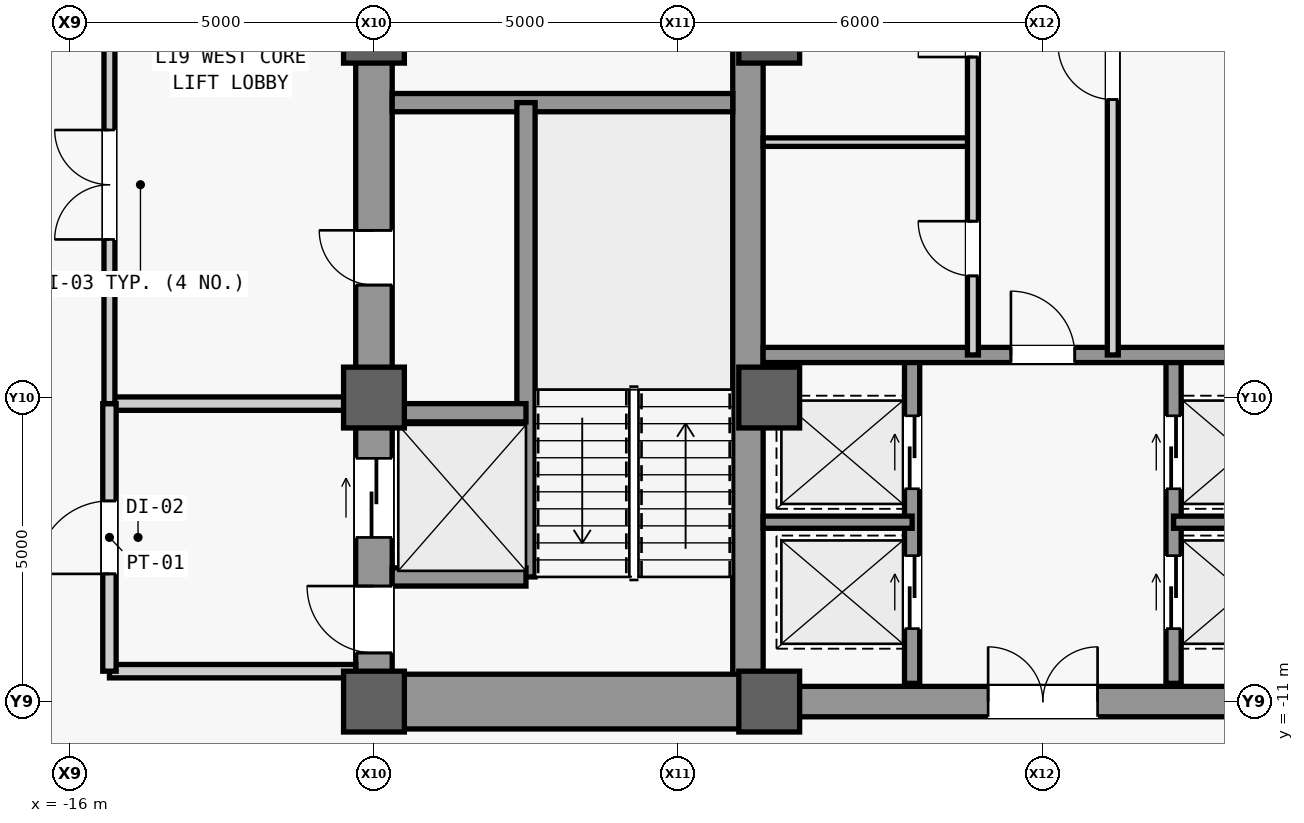
"""IFC4 building model, lengths in metres.
Left out: names, types, materials, properties, quantities, classifications, styles, units other than length and angle.
Written with IfcOpenShell. Run it as: python <this file> out.ifc"""

import sys

from ifc_helpers import new_model, si_unit, direction, frame, frame_2d, origin, origin_2d, place, context, subcontext, project, spatial, rectangle, extrude, source, transform, mapped, element, fill, save


model = new_model("IFC4")
c1 = context("Model", 3, precision=1e-05, world=origin(), true_north=direction((0.0, 1.0)))
c2 = subcontext(c1, "Body", "Model", "MODEL_VIEW")
j1 = project(units=[si_unit("LENGTHUNIT", "METRE"), si_unit("PLANEANGLEUNIT", "RADIAN")], contexts=[c1])
p1 = place(None, origin())
s1 = spatial("IfcSite", under=j1, at=p1, CompositionType="ELEMENT")
p2 = place(p1, origin())
s2 = spatial("IfcBuilding", under=s1, at=p2, CompositionType="ELEMENT")
p3 = place(p2, frame((0.0, 0.0, 87.2)))
s3 = spatial("IfcBuildingStorey", under=s2, at=p3, CompositionType="ELEMENT", Elevation=87.2)
m1 = source(origin(), c2, "Body", "SweptSolid", [
    extrude(rectangle(XDim=22.0, YDim=0.6, at=frame_2d((11.0, 0.0))), origin(), (0.0, 0.0, 1.0), 3.94),
])
p4 = place(p3, frame((-11.0, -11.0, 0.0), z_axis=(0.0, 0.0, 1.0), x_axis=(0.0, 1.0, 0.0)))
e1 = element("IfcWall", 1, at=p4, inside=s3, PredefinedType="SHEAR", context=c2, shape_type="MappedRepresentation", body=[
    mapped(m1, transform((0.0, 0.0, 0.0), scale=1.0)),
])
m2 = source(origin(), c2, "Body", "SweptSolid", [
    extrude(rectangle(XDim=1.1, YDim=2.2, at=frame_2d((0.55, 1.1))), frame((0.0, 0.31, 0.0), z_axis=(0.0, -1.0, 0.0), x_axis=(1.0, 0.0, 0.0)), (0.0, 0.0, 1.0), 0.62),
])
p5 = place(p4, frame((0.8, 0.0, 0.0)))
e2 = element("IfcOpeningElement", 2, at=p5, cuts=e1, PredefinedType="OPENING", context=c2, shape_type="MappedRepresentation", body=[
    mapped(m2, transform((0.0, 0.0, 0.0), scale=1.0)),
])
p6 = place(p4, frame((12.5, 0.0, 0.0)))
e3 = element("IfcOpeningElement", 3, at=p6, cuts=e1, PredefinedType="OPENING", context=c2, shape_type="MappedRepresentation", body=[
    mapped(m2, transform((0.0, 0.0, 0.0), scale=1.0)),
])
m3 = source(origin(), c2, "Body", "SweptSolid", [
    extrude(rectangle(XDim=0.9, YDim=2.15, at=frame_2d((0.45, 1.075))), frame((0.0, 0.31, 0.0), z_axis=(0.0, -1.0, 0.0), x_axis=(1.0, 0.0, 0.0)), (0.0, 0.0, 1.0), 0.62),
])
p7 = place(p4, frame((6.85, 0.0, 0.0)))
e4 = element("IfcOpeningElement", 4, at=p7, cuts=e1, PredefinedType="OPENING", context=c2, shape_type="MappedRepresentation", body=[
    mapped(m3, transform((0.0, 0.0, 0.0), scale=1.0)),
])
m4 = source(origin(), c2, "Body", "SweptSolid", [
    extrude(rectangle(XDim=1.3, YDim=2.3, at=frame_2d((0.65, 1.15))), frame((0.0, 0.31, 0.0), z_axis=(0.0, -1.0, 0.0), x_axis=(1.0, 0.0, 0.0)), (0.0, 0.0, 1.0), 0.62),
])
p8 = place(p4, frame((2.7, 0.0, 0.0)))
e5 = element("IfcOpeningElement", 5, at=p8, cuts=e1, PredefinedType="OPENING", context=c2, shape_type="MappedRepresentation", body=[
    mapped(m4, transform((0.0, 0.0, 0.0), scale=1.0)),
])
m5 = source(origin(), c2, "Body", "SweptSolid", [
    extrude(rectangle(XDim=21.4, YDim=0.5, at=frame_2d((10.7, 0.0))), origin(), (0.0, 0.0, 1.0), 3.94),
])
p9 = place(p3, frame((-4.85, -10.7, 0.0), z_axis=(0.0, 0.0, 1.0), x_axis=(0.0, 1.0, 0.0)))
e6 = element("IfcWall", 6, at=p9, inside=s3, PredefinedType="SHEAR", context=c2, shape_type="MappedRepresentation", body=[
    mapped(m5, transform((0.0, 0.0, 0.0), scale=1.0)),
])
m6 = source(origin(), c2, "Body", "SweptSolid", [
    extrude(rectangle(XDim=5.85, YDim=0.9, at=frame_2d((2.925, 0.0))), origin(), (0.0, 0.0, 1.0), 3.94),
])
p10 = place(p3, frame((-10.7, -11.0, 0.0), z_axis=(0.0, 0.0, 1.0), x_axis=(1.0, 0.0, 0.0)))
e7 = element("IfcWall", 7, at=p10, inside=s3, PredefinedType="SHEAR", context=c2, shape_type="MappedRepresentation", body=[
    mapped(m6, transform((0.0, 0.0, 0.0), scale=1.0)),
])
m7 = source(origin(), c2, "Body", "SweptSolid", [
    extrude(rectangle(XDim=5.6, YDim=0.3, at=frame_2d((2.8, 0.0))), origin(), (0.0, 0.0, 1.0), 3.94),
])
p11 = place(p3, frame((-10.7, -1.15, 0.0), z_axis=(0.0, 0.0, 1.0), x_axis=(1.0, 0.0, 0.0)))
e8 = element("IfcWall", 8, at=p11, inside=s3, PredefinedType="SHEAR", context=c2, shape_type="MappedRepresentation", body=[
    mapped(m7, transform((0.0, 0.0, 0.0), scale=1.0)),
])
m8 = source(origin(), c2, "Body", "SweptSolid", [
    extrude(rectangle(XDim=9.2, YDim=0.5, at=frame_2d((4.6, 0.0))), origin(), (0.0, 0.0, 1.0), 3.94),
])
p12 = place(p3, frame((-4.6, -11.0, 0.0), z_axis=(0.0, 0.0, 1.0), x_axis=(1.0, 0.0, 0.0)))
e9 = element("IfcWall", 9, at=p12, inside=s3, PredefinedType="SHEAR", context=c2, shape_type="MappedRepresentation", body=[
    mapped(m8, transform((0.0, 0.0, 0.0), scale=1.0)),
])
m9 = source(origin(), c2, "Body", "SweptSolid", [
    extrude(rectangle(XDim=1.8, YDim=2.25, at=frame_2d((0.9, 1.125))), frame((0.0, 0.26, 0.0), z_axis=(0.0, -1.0, 0.0), x_axis=(1.0, 0.0, 0.0)), (0.0, 0.0, 1.0), 0.52),
])
p13 = place(p12, frame((3.7, 0.0, 0.0)))
e10 = element("IfcOpeningElement", 10, at=p13, cuts=e9, PredefinedType="OPENING", context=c2, shape_type="MappedRepresentation", body=[
    mapped(m9, transform((0.0, 0.0, 0.0), scale=1.0)),
])
m10 = source(origin(), c2, "Body", "SweptSolid", [
    extrude(rectangle(XDim=1.0, YDim=1.0, at=origin_2d()), origin(), (0.0, 0.0, 1.0), 4.2),
])
for number, where, z_axis, x_axis in (
    (11, (-11.0, -11.0, 0.0), (0.0, 0.0, 1.0), (1.0, 0.0, 0.0)),
    (12, (-11.0, -6.0, 0.0), (0.0, 0.0, 1.0), (1.0, 0.0, 0.0)),
    (13, (-11.0, 0.0, 0.0), (0.0, 0.0, 1.0), (1.0, 0.0, 0.0)),
    (14, (-4.5, -11.0, 0.0), (0.0, 0.0, 1.0), (1.0, 0.0, 0.0)),
    (15, (-4.5, -6.0, 0.0), (0.0, 0.0, 1.0), (1.0, 0.0, 0.0)),
    (16, (-4.5, 0.0, 0.0), (0.0, 0.0, 1.0), (1.0, 0.0, 0.0)),
):
    element("IfcColumn", number, at=place(p3, frame(where, z_axis=z_axis, x_axis=x_axis)), inside=s3, PredefinedType="COLUMN", context=c2, shape_type="MappedRepresentation", body=[
        mapped(m10, transform((0.0, 0.0, 0.0), scale=1.0)),
    ])
m11 = source(origin(), c2, "Body", "SweptSolid", [
    extrude(rectangle(XDim=7.8, YDim=0.3, at=frame_2d((3.9, 0.0))), origin(), (0.0, 0.0, 1.0), 3.94),
])
p14 = place(p3, frame((-8.5, -8.95, 0.0), z_axis=(0.0, 0.0, 1.0), x_axis=(0.0, 1.0, 0.0)))
e17 = element("IfcWall", 17, at=p14, inside=s3, PredefinedType="SHEAR", context=c2, shape_type="MappedRepresentation", body=[
    mapped(m11, transform((0.0, 0.0, 0.0), scale=1.0)),
])
m12 = source(origin(), c2, "Body", "SweptSolid", [
    extrude(rectangle(XDim=2.2, YDim=0.3, at=frame_2d((1.1, 0.0))), origin(), (0.0, 0.0, 1.0), 3.94),
])
for number, where, z_axis, x_axis in (
    (18, (-10.7, -8.95, 0.0), (0.0, 0.0, 1.0), (1.0, 0.0, 0.0)),
    (19, (-10.7, -6.25, 0.0), (0.0, 0.0, 1.0), (1.0, 0.0, 0.0)),
):
    element("IfcWall", number, at=place(p3, frame(where, z_axis=z_axis, x_axis=x_axis)), inside=s3, PredefinedType="SHEAR", context=c2, shape_type="MappedRepresentation", body=[
        mapped(m12, transform((0.0, 0.0, 0.0), scale=1.0)),
    ])
m13 = source(origin(), c2, "Body", "SweptSolid", [
    extrude(rectangle(XDim=4.05, YDim=0.22, at=frame_2d((2.025, 0.0))), origin(), (0.0, 0.0, 1.0), 3.94),
])
p15 = place(p3, frame((-15.35, -10.5, 0.0), z_axis=(0.0, 0.0, 1.0), x_axis=(1.0, 0.0, 0.0)))
e20 = element("IfcWall", 20, at=p15, inside=s3, PredefinedType="PARTITIONING", context=c2, shape_type="MappedRepresentation", body=[
    mapped(m13, transform((0.0, 0.0, 0.0), scale=1.0)),
])
m14 = source(origin(), c2, "Body", "SweptSolid", [
    extrude(rectangle(XDim=4.05, YDim=0.22, at=frame_2d((2.025, 0.0))), origin(), (0.0, 0.0, 1.0), 2.54),
])
p16 = place(p3, frame((-15.35, -6.1, 0.0), z_axis=(0.0, 0.0, 1.0), x_axis=(1.0, 0.0, 0.0)))
e21 = element("IfcWall", 21, at=p16, inside=s3, PredefinedType="PARTITIONING", context=c2, shape_type="MappedRepresentation", body=[
    mapped(m14, transform((0.0, 0.0, 0.0), scale=1.0)),
])
m15 = source(origin(), c2, "Body", "SweptSolid", [
    extrude(rectangle(XDim=4.4, YDim=0.22, at=frame_2d((2.2, 0.0))), origin(), (0.0, 0.0, 1.0), 3.94),
])
p17 = place(p3, frame((-15.35, -10.5, 0.0), z_axis=(0.0, 0.0, 1.0), x_axis=(0.0, 1.0, 0.0)))
e22 = element("IfcWall", 22, at=p17, inside=s3, PredefinedType="PARTITIONING", context=c2, shape_type="MappedRepresentation", body=[
    mapped(m15, transform((0.0, 0.0, 0.0), scale=1.0)),
])
m16 = source(origin(), c2, "Body", "SweptSolid", [
    extrude(rectangle(XDim=1.2, YDim=2.2, at=frame_2d((0.6, 1.1))), frame((0.0, 0.12, 0.0), z_axis=(0.0, -1.0, 0.0), x_axis=(1.0, 0.0, 0.0)), (0.0, 0.0, 1.0), 0.24),
])
p18 = place(p17, frame((1.6, 0.0, 0.0)))
e23 = element("IfcOpeningElement", 23, at=p18, cuts=e22, PredefinedType="OPENING", context=c2, shape_type="MappedRepresentation", body=[
    mapped(m16, transform((0.0, 0.0, 0.0), scale=1.0)),
])
m17 = source(origin(), c2, "Body", "SweptSolid", [
    extrude(rectangle(XDim=16.6, YDim=0.18, at=frame_2d((8.3, 0.0))), origin(), (0.0, 0.0, 1.0), 3.94),
])
p19 = place(p3, frame((-15.35, -6.1, 0.0), z_axis=(0.0, 0.0, 1.0), x_axis=(0.0, 1.0, 0.0)))
e24 = element("IfcWall", 24, at=p19, inside=s3, PredefinedType="PARTITIONING", context=c2, shape_type="MappedRepresentation", body=[
    mapped(m17, transform((0.0, 0.0, 0.0), scale=1.0)),
])
m18 = source(origin(), c2, "Body", "SweptSolid", [
    extrude(rectangle(XDim=1.8, YDim=2.25, at=frame_2d((0.9, 1.125))), frame((0.0, 0.1, 0.0), z_axis=(0.0, -1.0, 0.0), x_axis=(1.0, 0.0, 0.0)), (0.0, 0.0, 1.0), 0.2),
])
p20 = place(p19, frame((2.7, 0.0, 0.0)))
e25 = element("IfcOpeningElement", 25, at=p20, cuts=e24, PredefinedType="OPENING", context=c2, shape_type="MappedRepresentation", body=[
    mapped(m18, transform((0.0, 0.0, 0.0), scale=1.0)),
])
p21 = place(p19, frame((11.0, 0.0, 0.0)))
e26 = element("IfcOpeningElement", 26, at=p21, cuts=e24, PredefinedType="OPENING", context=c2, shape_type="MappedRepresentation", body=[
    mapped(m18, transform((0.0, 0.0, 0.0), scale=1.0)),
])
m19 = source(origin(), c2, "Body", "SweptSolid", [
    extrude(rectangle(XDim=5.4, YDim=0.25, at=frame_2d((2.7, 0.0))), origin(), (0.0, 0.0, 1.0), 3.94),
])
p22 = place(p3, frame((-2.15, -10.7, 0.0), z_axis=(0.0, 0.0, 1.0), x_axis=(0.0, 1.0, 0.0)))
e27 = element("IfcWall", 27, at=p22, inside=s3, PredefinedType="SHEAR", context=c2, shape_type="MappedRepresentation", body=[
    mapped(m19, transform((0.0, 0.0, 0.0), scale=1.0)),
])
m20 = source(origin(), c2, "Body", "SweptSolid", [
    extrude(rectangle(XDim=1.2, YDim=2.3, at=frame_2d((0.6, 1.15))), frame((0.0, 0.135, 0.0), z_axis=(0.0, -1.0, 0.0), x_axis=(1.0, 0.0, 0.0)), (0.0, 0.0, 1.0), 0.27),
])
p23 = place(p22, frame((0.9, 0.0, 0.0)))
e28 = element("IfcOpeningElement", 28, at=p23, cuts=e27, PredefinedType="OPENING", context=c2, shape_type="MappedRepresentation", body=[
    mapped(m20, transform((0.0, 0.0, 0.0), scale=1.0)),
])
p24 = place(p22, frame((3.2, 0.0, 0.0)))
e29 = element("IfcOpeningElement", 29, at=p24, cuts=e27, PredefinedType="OPENING", context=c2, shape_type="MappedRepresentation", body=[
    mapped(m20, transform((0.0, 0.0, 0.0), scale=1.0)),
])
p25 = place(p3, frame((2.15, -10.7, 0.0), z_axis=(0.0, 0.0, 1.0), x_axis=(0.0, 1.0, 0.0)))
e30 = element("IfcWall", 30, at=p25, inside=s3, PredefinedType="SHEAR", context=c2, shape_type="MappedRepresentation", body=[
    mapped(m19, transform((0.0, 0.0, 0.0), scale=1.0)),
])
p26 = place(p25, frame((0.9, 0.0, 0.0)))
e31 = element("IfcOpeningElement", 31, at=p26, cuts=e30, PredefinedType="OPENING", context=c2, shape_type="MappedRepresentation", body=[
    mapped(m20, transform((0.0, 0.0, 0.0), scale=1.0)),
])
p27 = place(p25, frame((3.2, 0.0, 0.0)))
e32 = element("IfcOpeningElement", 32, at=p27, cuts=e30, PredefinedType="OPENING", context=c2, shape_type="MappedRepresentation", body=[
    mapped(m20, transform((0.0, 0.0, 0.0), scale=1.0)),
])
m21 = source(origin(), c2, "Body", "SweptSolid", [
    extrude(rectangle(XDim=2.45, YDim=0.2, at=frame_2d((1.225, 0.0))), origin(), (0.0, 0.0, 1.0), 3.94),
])
for number, where, z_axis, x_axis in (
    (33, (-4.6, -8.05, 0.0), (0.0, 0.0, 1.0), (1.0, 0.0, 0.0)),
    (34, (2.15, -8.05, 0.0), (0.0, 0.0, 1.0), (1.0, 0.0, 0.0)),
):
    element("IfcWall", number, at=place(p3, frame(where, z_axis=z_axis, x_axis=x_axis)), inside=s3, PredefinedType="SHEAR", context=c2, shape_type="MappedRepresentation", body=[
        mapped(m21, transform((0.0, 0.0, 0.0), scale=1.0)),
    ])
m22 = source(origin(), c2, "Body", "SweptSolid", [
    extrude(rectangle(XDim=9.2, YDim=0.25, at=frame_2d((4.6, 0.0))), origin(), (0.0, 0.0, 1.0), 3.94),
])
p28 = place(p3, frame((-4.6, -5.3, 0.0), z_axis=(0.0, 0.0, 1.0), x_axis=(1.0, 0.0, 0.0)))
e35 = element("IfcWall", 35, at=p28, inside=s3, PredefinedType="SHEAR", context=c2, shape_type="MappedRepresentation", body=[
    mapped(m22, transform((0.0, 0.0, 0.0), scale=1.0)),
])
m23 = source(origin(), c2, "Body", "SweptSolid", [
    extrude(rectangle(XDim=1.05, YDim=2.2, at=frame_2d((0.525, 1.1))), frame((0.0, 0.135, 0.0), z_axis=(0.0, -1.0, 0.0), x_axis=(1.0, 0.0, 0.0)), (0.0, 0.0, 1.0), 0.27),
])
p29 = place(p28, frame((4.075, 0.0, 0.0)))
e36 = element("IfcOpeningElement", 36, at=p29, cuts=e35, PredefinedType="OPENING", context=c2, shape_type="MappedRepresentation", body=[
    mapped(m23, transform((0.0, 0.0, 0.0), scale=1.0)),
])
m24 = source(origin(), c2, "Body", "SweptSolid", [
    extrude(rectangle(XDim=3.45, YDim=0.14, at=frame_2d((1.725, 0.0))), origin(), (0.0, 0.0, 1.0), 3.94),
])
p30 = place(p3, frame((-4.6, -1.8, 0.0), z_axis=(0.0, 0.0, 1.0), x_axis=(1.0, 0.0, 0.0)))
e37 = element("IfcWall", 37, at=p30, inside=s3, PredefinedType="PARTITIONING", context=c2, shape_type="MappedRepresentation", body=[
    mapped(m24, transform((0.0, 0.0, 0.0), scale=1.0)),
])
m25 = source(origin(), c2, "Body", "SweptSolid", [
    extrude(rectangle(XDim=10.6, YDim=0.18, at=frame_2d((5.3, 0.0))), origin(), (0.0, 0.0, 1.0), 3.94),
])
p31 = place(p3, frame((-1.15, -5.3, 0.0), z_axis=(0.0, 0.0, 1.0), x_axis=(0.0, 1.0, 0.0)))
e38 = element("IfcWall", 38, at=p31, inside=s3, PredefinedType="PARTITIONING", context=c2, shape_type="MappedRepresentation", body=[
    mapped(m25, transform((0.0, 0.0, 0.0), scale=1.0)),
])
m26 = source(origin(), c2, "Body", "SweptSolid", [
    extrude(rectangle(XDim=0.9, YDim=2.15, at=frame_2d((0.45, 1.075))), frame((0.0, 0.1, 0.0), z_axis=(0.0, -1.0, 0.0), x_axis=(1.0, 0.0, 0.0)), (0.0, 0.0, 1.0), 0.2),
])
p32 = place(p31, frame((1.3, 0.0, 0.0)))
e39 = element("IfcOpeningElement", 39, at=p32, cuts=e38, PredefinedType="OPENING", context=c2, shape_type="MappedRepresentation", body=[
    mapped(m26, transform((0.0, 0.0, 0.0), scale=1.0)),
])
p33 = place(p31, frame((4.9, 0.0, 0.0)))
e40 = element("IfcOpeningElement", 40, at=p33, cuts=e38, PredefinedType="OPENING", context=c2, shape_type="MappedRepresentation", body=[
    mapped(m26, transform((0.0, 0.0, 0.0), scale=1.0)),
])
p34 = place(p31, frame((7.8, 0.0, 0.0)))
e41 = element("IfcOpeningElement", 41, at=p34, cuts=e38, PredefinedType="OPENING", context=c2, shape_type="MappedRepresentation", body=[
    mapped(m26, transform((0.0, 0.0, 0.0), scale=1.0)),
])
p35 = place(p31, frame((9.475, 0.0, 0.0)))
e42 = element("IfcOpeningElement", 42, at=p35, cuts=e38, PredefinedType="OPENING", context=c2, shape_type="MappedRepresentation", body=[
    mapped(m26, transform((0.0, 0.0, 0.0), scale=1.0)),
])
p36 = place(p3, frame((1.15, -5.3, 0.0), z_axis=(0.0, 0.0, 1.0), x_axis=(0.0, 1.0, 0.0)))
e43 = element("IfcWall", 43, at=p36, inside=s3, PredefinedType="PARTITIONING", context=c2, shape_type="MappedRepresentation", body=[
    mapped(m25, transform((0.0, 0.0, 0.0), scale=1.0)),
])
p37 = place(p36, frame((4.2, 0.0, 0.0)))
e44 = element("IfcOpeningElement", 44, at=p37, cuts=e43, PredefinedType="OPENING", context=c2, shape_type="MappedRepresentation", body=[
    mapped(m26, transform((0.0, 0.0, 0.0), scale=1.0)),
])
p38 = place(p36, frame((9.475, 0.0, 0.0)))
e45 = element("IfcOpeningElement", 45, at=p38, cuts=e43, PredefinedType="OPENING", context=c2, shape_type="MappedRepresentation", body=[
    mapped(m26, transform((0.0, 0.0, 0.0), scale=1.0)),
])
m27 = source(origin(), c2, "Body", "SweptSolid", [
    extrude(rectangle(XDim=1.1, YDim=2.2, at=frame_2d((0.55, 1.1))), frame((0.0, 0.025, 0.0), z_axis=(0.0, -1.0, 0.0), x_axis=(1.0, 0.0, 0.0)), (0.0, 0.0, 1.0), 0.05),
])
p39 = place(p5, origin())
e46 = element("IfcDoor", 46, at=p39, inside=s3, OperationType="SINGLE_SWING_RIGHT", PredefinedType="DOOR", context=c2, shape_type="MappedRepresentation", body=[
    mapped(m27, transform((0.0, 0.0, 0.0), scale=1.0)),
])
fill(e2, e46)
m28 = source(origin(), c2, "Body", "SweptSolid", [
    extrude(rectangle(XDim=0.9, YDim=2.15, at=frame_2d((0.45, 1.075))), frame((0.0, 0.025, 0.0), z_axis=(0.0, -1.0, 0.0), x_axis=(1.0, 0.0, 0.0)), (0.0, 0.0, 1.0), 0.05),
])
p40 = place(p7, origin())
e47 = element("IfcDoor", 47, at=p40, inside=s3, OperationType="SINGLE_SWING_RIGHT", PredefinedType="DOOR", context=c2, shape_type="MappedRepresentation", body=[
    mapped(m28, transform((0.0, 0.0, 0.0), scale=1.0)),
])
fill(e4, e47)
m29 = source(origin(), c2, "Body", "SweptSolid", [
    extrude(rectangle(XDim=1.2, YDim=2.2, at=frame_2d((0.6, 1.1))), frame((0.0, 0.025, 0.0), z_axis=(0.0, -1.0, 0.0), x_axis=(1.0, 0.0, 0.0)), (0.0, 0.0, 1.0), 0.05),
])
p41 = place(p18, origin())
e48 = element("IfcDoor", 48, at=p41, inside=s3, OperationType="SINGLE_SWING_LEFT", PredefinedType="DOOR", context=c2, shape_type="MappedRepresentation", body=[
    mapped(m29, transform((0.0, 0.0, 0.0), scale=1.0)),
])
fill(e23, e48)
m30 = source(origin(), c2, "Body", "SweptSolid", [
    extrude(rectangle(XDim=1.8, YDim=2.25, at=frame_2d((0.9, 1.125))), frame((0.0, 0.025, 0.0), z_axis=(0.0, -1.0, 0.0), x_axis=(1.0, 0.0, 0.0)), (0.0, 0.0, 1.0), 0.05),
])
p42 = place(p20, origin())
e49 = element("IfcDoor", 49, at=p42, inside=s3, OperationType="SINGLE_SWING_LEFT", PredefinedType="DOOR", context=c2, shape_type="MappedRepresentation", body=[
    mapped(m30, transform((0.0, 0.0, 0.0), scale=1.0)),
])
fill(e25, e49)
m31 = source(origin(), c2, "Body", "SweptSolid", [
    extrude(rectangle(XDim=1.05, YDim=2.2, at=frame_2d((0.525, 1.1))), frame((0.0, 0.025, 0.0), z_axis=(0.0, -1.0, 0.0), x_axis=(1.0, 0.0, 0.0)), (0.0, 0.0, 1.0), 0.05),
])
p43 = place(p29, origin())
e50 = element("IfcDoor", 50, at=p43, inside=s3, OperationType="SINGLE_SWING_LEFT", PredefinedType="DOOR", context=c2, shape_type="MappedRepresentation", body=[
    mapped(m31, transform((0.0, 0.0, 0.0), scale=1.0)),
])
fill(e36, e50)
p44 = place(p13, origin())
e51 = element("IfcDoor", 51, at=p44, inside=s3, OperationType="SINGLE_SWING_LEFT", PredefinedType="DOOR", context=c2, shape_type="MappedRepresentation", body=[
    mapped(m30, transform((0.0, 0.0, 0.0), scale=1.0)),
])
fill(e10, e51)
p45 = place(p32, origin())
e52 = element("IfcDoor", 52, at=p45, inside=s3, OperationType="SINGLE_SWING_RIGHT", PredefinedType="DOOR", context=c2, shape_type="MappedRepresentation", body=[
    mapped(m28, transform((0.0, 0.0, 0.0), scale=1.0)),
])
fill(e39, e52)
p46 = place(p33, origin())
e53 = element("IfcDoor", 53, at=p46, inside=s3, OperationType="SINGLE_SWING_LEFT", PredefinedType="DOOR", context=c2, shape_type="MappedRepresentation", body=[
    mapped(m28, transform((0.0, 0.0, 0.0), scale=1.0)),
])
fill(e40, e53)
p47 = place(p37, origin())
e54 = element("IfcDoor", 54, at=p47, inside=s3, OperationType="SINGLE_SWING_RIGHT", PredefinedType="DOOR", context=c2, shape_type="MappedRepresentation", body=[
    mapped(m28, transform((0.0, 0.0, 0.0), scale=1.0)),
])
fill(e44, e54)
m32 = source(origin(), c2, "Body", "SweptSolid", [
    extrude(rectangle(XDim=1.2, YDim=2.3, at=frame_2d((0.6, 1.15))), frame((0.0, 0.025, 0.0), z_axis=(0.0, -1.0, 0.0), x_axis=(1.0, 0.0, 0.0)), (0.0, 0.0, 1.0), 0.05),
])
p48 = place(p23, origin())
e55 = element("IfcDoor", 55, at=p48, inside=s3, OperationType="SLIDING_TO_LEFT", PredefinedType="DOOR", context=c2, shape_type="MappedRepresentation", body=[
    mapped(m32, transform((0.0, 0.0, 0.0), scale=1.0)),
])
fill(e28, e55)
p49 = place(p26, origin())
e56 = element("IfcDoor", 56, at=p49, inside=s3, OperationType="SLIDING_TO_LEFT", PredefinedType="DOOR", context=c2, shape_type="MappedRepresentation", body=[
    mapped(m32, transform((0.0, 0.0, 0.0), scale=1.0)),
])
fill(e31, e56)
p50 = place(p24, origin())
e57 = element("IfcDoor", 57, at=p50, inside=s3, OperationType="SLIDING_TO_LEFT", PredefinedType="DOOR", context=c2, shape_type="MappedRepresentation", body=[
    mapped(m32, transform((0.0, 0.0, 0.0), scale=1.0)),
])
fill(e29, e57)
p51 = place(p27, origin())
e58 = element("IfcDoor", 58, at=p51, inside=s3, OperationType="SLIDING_TO_LEFT", PredefinedType="DOOR", context=c2, shape_type="MappedRepresentation", body=[
    mapped(m32, transform((0.0, 0.0, 0.0), scale=1.0)),
])
fill(e32, e58)
m33 = source(origin(), c2, "Body", "SweptSolid", [
    extrude(rectangle(XDim=1.3, YDim=2.3, at=frame_2d((0.65, 1.15))), frame((0.0, 0.025, 0.0), z_axis=(0.0, -1.0, 0.0), x_axis=(1.0, 0.0, 0.0)), (0.0, 0.0, 1.0), 0.05),
])
p52 = place(p8, origin())
e59 = element("IfcDoor", 59, at=p52, inside=s3, OperationType="SLIDING_TO_LEFT", PredefinedType="DOOR", context=c2, shape_type="MappedRepresentation", body=[
    mapped(m33, transform((0.0, 0.0, 0.0), scale=1.0)),
])
fill(e5, e59)
save(model, sys.argv[1])
